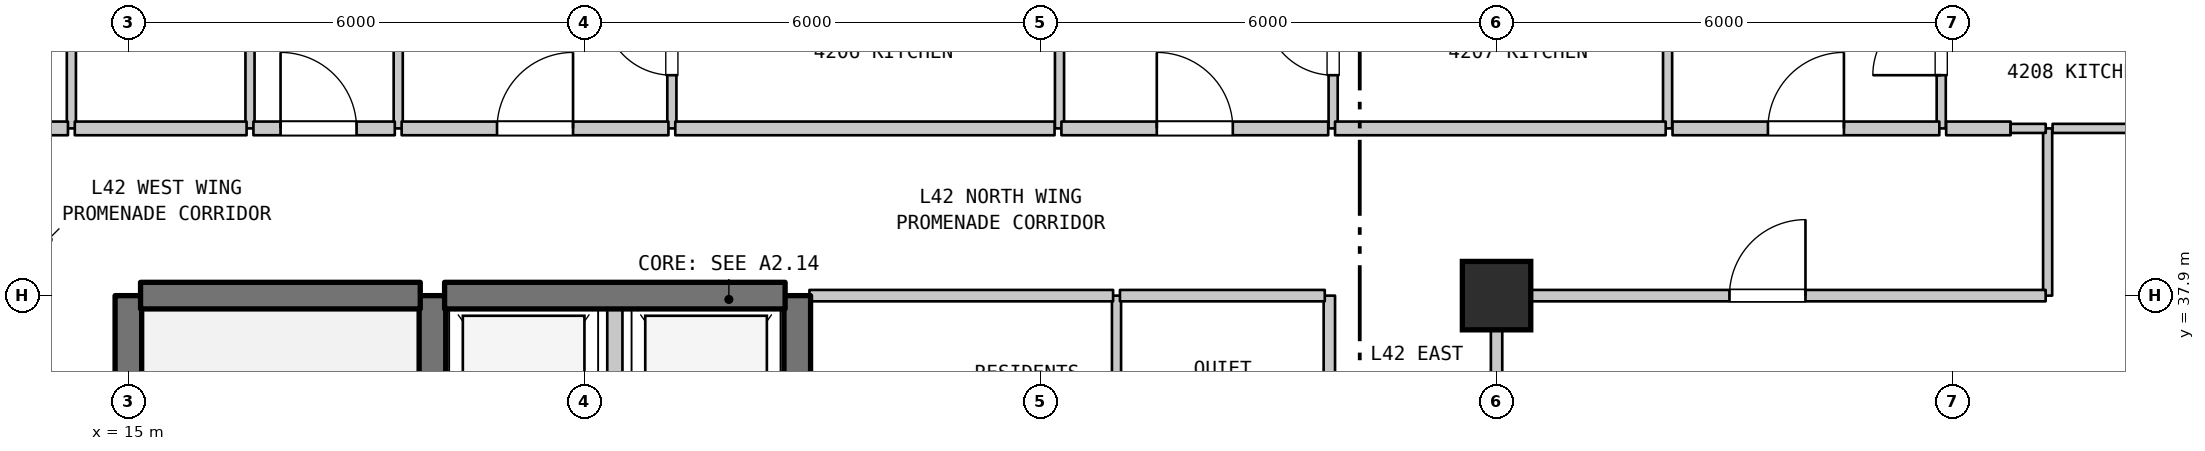
"""IFC4 building model, lengths in metres.
Left out: names, types, materials, properties, quantities, classifications, styles, units other than length and angle.
Written with IfcOpenShell. Run it as: python <this file> out.ifc"""

import sys

from ifc_helpers import new_model, si_unit, direction, frame, frame_2d, origin, origin_2d, place, context, subcontext, project, spatial, rectangle, extrude, element, fill, save


model = new_model("IFC4")
c1 = context("Model", 3, precision=1e-05, world=origin(), true_north=direction((0.0, 1.0)))
c2 = subcontext(c1, "Body", "Model", "MODEL_VIEW")
j1 = project(units=[si_unit("LENGTHUNIT", "METRE"), si_unit("PLANEANGLEUNIT", "RADIAN")], contexts=[c1])
p1 = place(None, origin())
s1 = spatial("IfcSite", under=j1, at=p1, CompositionType="ELEMENT")
p2 = place(p1, origin())
s2 = spatial("IfcBuilding", under=s1, at=p2, CompositionType="ELEMENT")
p3 = place(p2, frame((0.0, 0.0, 172.8)))
s3 = spatial("IfcBuildingStorey", under=s2, at=p3, CompositionType="ELEMENT", Elevation=172.8)
p4 = place(p3, frame((33.0, 37.9, 0.0), z_axis=(0.0, 0.0, 1.0), x_axis=(1.0, 0.0, 0.0)))
e1 = element("IfcColumn", 1, at=p4, inside=s3, PredefinedType="COLUMN", context=c2, shape_type="SweptSolid", body=[
    extrude(rectangle(XDim=0.9, YDim=0.9, at=origin_2d()), origin(), (0.0, 0.0, 1.0), 3.7),
])
p5 = place(p3, frame((14.25, 40.1, 0.0), z_axis=(0.0, 0.0, 1.0), x_axis=(0.0, 1.0, 0.0)))
e2 = element("IfcWall", 2, at=p5, inside=s3, PredefinedType="PARTITIONING", context=c2, shape_type="SweptSolid", body=[
    extrude(rectangle(XDim=3.2, YDim=0.12, at=frame_2d((1.6, 0.0))), origin(), (0.0, 0.0, 1.0), 3.39),
])
p6 = place(p5, frame((1.15, 0.0, 0.0)))
e3 = element("IfcOpeningElement", 3, at=p6, cuts=e2, PredefinedType="OPENING", context=c2, shape_type="SweptSolid", body=[
    extrude(rectangle(XDim=0.9, YDim=2.15, at=frame_2d((0.45, 1.075))), frame((0.0, 0.07, 0.0), z_axis=(0.0, -1.0, 0.0), x_axis=(1.0, 0.0, 0.0)), (0.0, 0.0, 1.0), 0.14),
])
p7 = place(p3, frame((15.0, 31.1, 0.0), z_axis=(0.0, 0.0, 1.0), x_axis=(0.0, 1.0, 0.0)))
e4 = element("IfcWall", 4, at=p7, inside=s3, PredefinedType="SHEAR", context=c2, shape_type="SweptSolid", body=[
    extrude(rectangle(XDim=6.8, YDim=0.35, at=frame_2d((3.4, 0.0))), origin(), (0.0, 0.0, 1.0), 3.39),
])
p8 = place(p3, frame((16.6, 40.1, 0.0), z_axis=(0.0, 0.0, 1.0), x_axis=(0.0, 1.0, 0.0)))
e5 = element("IfcWall", 5, at=p8, inside=s3, PredefinedType="PARTITIONING", context=c2, shape_type="SweptSolid", body=[
    extrude(rectangle(XDim=3.2, YDim=0.12, at=frame_2d((1.6, 0.0))), origin(), (0.0, 0.0, 1.0), 3.39),
])
p9 = place(p3, frame((18.55, 40.1, 0.0), z_axis=(0.0, 0.0, 1.0), x_axis=(0.0, 1.0, 0.0)))
e6 = element("IfcWall", 6, at=p9, inside=s3, PredefinedType="PARTITIONING", context=c2, shape_type="SweptSolid", body=[
    extrude(rectangle(XDim=13.79, YDim=0.12, at=frame_2d((6.895, 0.0))), origin(), (0.0, 0.0, 1.0), 3.39),
])
p10 = place(p3, frame((19.0, 35.0, 0.0), z_axis=(0.0, 0.0, 1.0), x_axis=(0.0, 1.0, 0.0)))
e7 = element("IfcWall", 7, at=p10, inside=s3, PredefinedType="SHEAR", context=c2, shape_type="SweptSolid", body=[
    extrude(rectangle(XDim=2.9, YDim=0.35, at=frame_2d((1.45, 0.0))), origin(), (0.0, 0.0, 1.0), 3.39),
])
p11 = place(p3, frame((21.4, 35.0, 0.0), z_axis=(0.0, 0.0, 1.0), x_axis=(0.0, 1.0, 0.0)))
e8 = element("IfcWall", 8, at=p11, inside=s3, PredefinedType="STANDARD", context=c2, shape_type="SweptSolid", body=[
    extrude(rectangle(XDim=2.9, YDim=0.2, at=frame_2d((1.45, 0.0))), origin(), (0.0, 0.0, 1.0), 3.39),
])
p12 = place(p3, frame((22.15, 40.1, 0.0), z_axis=(0.0, 0.0, 1.0), x_axis=(0.0, 1.0, 0.0)))
e9 = element("IfcWall", 9, at=p12, inside=s3, PredefinedType="PARTITIONING", context=c2, shape_type="SweptSolid", body=[
    extrude(rectangle(XDim=2.3, YDim=0.12, at=frame_2d((1.15, 0.0))), origin(), (0.0, 0.0, 1.0), 3.39),
])
p13 = place(p12, frame((0.7, 0.0, 0.0)))
e10 = element("IfcOpeningElement", 10, at=p13, cuts=e9, PredefinedType="OPENING", context=c2, shape_type="SweptSolid", body=[
    extrude(rectangle(XDim=0.9, YDim=2.15, at=frame_2d((0.45, 1.075))), frame((0.0, 0.07, 0.0), z_axis=(0.0, -1.0, 0.0), x_axis=(1.0, 0.0, 0.0)), (0.0, 0.0, 1.0), 0.14),
])
p14 = place(p3, frame((23.8, 35.0, 0.0), z_axis=(0.0, 0.0, 1.0), x_axis=(0.0, 1.0, 0.0)))
e11 = element("IfcWall", 11, at=p14, inside=s3, PredefinedType="SHEAR", context=c2, shape_type="SweptSolid", body=[
    extrude(rectangle(XDim=2.9, YDim=0.35, at=frame_2d((1.45, 0.0))), origin(), (0.0, 0.0, 1.0), 3.39),
])
p15 = place(p3, frame((27.25, 40.1, 0.0), z_axis=(0.0, 0.0, 1.0), x_axis=(0.0, 1.0, 0.0)))
e12 = element("IfcWall", 12, at=p15, inside=s3, PredefinedType="PARTITIONING", context=c2, shape_type="SweptSolid", body=[
    extrude(rectangle(XDim=2.3, YDim=0.12, at=frame_2d((1.15, 0.0))), origin(), (0.0, 0.0, 1.0), 3.39),
])
p16 = place(p3, frame((28.0, 35.0, 0.0), z_axis=(0.0, 0.0, 1.0), x_axis=(0.0, 1.0, 0.0)))
e13 = element("IfcWall", 13, at=p16, inside=s3, PredefinedType="PARTITIONING", context=c2, shape_type="SweptSolid", body=[
    extrude(rectangle(XDim=2.9, YDim=0.12, at=frame_2d((1.45, 0.0))), origin(), (0.0, 0.0, 1.0), 3.39),
])
p17 = place(p3, frame((30.8, 35.0, 0.0), z_axis=(0.0, 0.0, 1.0), x_axis=(0.0, 1.0, 0.0)))
e14 = element("IfcWall", 14, at=p17, inside=s3, PredefinedType="STANDARD", context=c2, shape_type="SweptSolid", body=[
    extrude(rectangle(XDim=2.9, YDim=0.15, at=frame_2d((1.45, 0.0))), origin(), (0.0, 0.0, 1.0), 3.39),
])
p18 = place(p3, frame((30.85, 40.1, 0.0), z_axis=(0.0, 0.0, 1.0), x_axis=(0.0, 1.0, 0.0)))
e15 = element("IfcWall", 15, at=p18, inside=s3, PredefinedType="PARTITIONING", context=c2, shape_type="SweptSolid", body=[
    extrude(rectangle(XDim=2.3, YDim=0.12, at=frame_2d((1.15, 0.0))), origin(), (0.0, 0.0, 1.0), 3.39),
])
p19 = place(p18, frame((0.7, 0.0, 0.0)))
e16 = element("IfcOpeningElement", 16, at=p19, cuts=e15, PredefinedType="OPENING", context=c2, shape_type="SweptSolid", body=[
    extrude(rectangle(XDim=0.9, YDim=2.15, at=frame_2d((0.45, 1.075))), frame((0.0, 0.07, 0.0), z_axis=(0.0, -1.0, 0.0), x_axis=(1.0, 0.0, 0.0)), (0.0, 0.0, 1.0), 0.14),
])
p20 = place(p3, frame((33.0, 32.8, 0.0), z_axis=(0.0, 0.0, 1.0), x_axis=(0.0, 1.0, 0.0)))
e17 = element("IfcWall", 17, at=p20, inside=s3, PredefinedType="STANDARD", context=c2, shape_type="SweptSolid", body=[
    extrude(rectangle(XDim=5.1, YDim=0.15, at=frame_2d((2.55, 0.0))), origin(), (0.0, 0.0, 1.0), 2.89),
])
p21 = place(p20, frame((1.978, 0.0, 0.0)))
e18 = element("IfcOpeningElement", 18, at=p21, cuts=e17, PredefinedType="OPENING", context=c2, shape_type="SweptSolid", body=[
    extrude(rectangle(XDim=1.0, YDim=2.15, at=frame_2d((0.5, 1.075))), frame((0.0, 0.085, 0.0), z_axis=(0.0, -1.0, 0.0), x_axis=(1.0, 0.0, 0.0)), (0.0, 0.0, 1.0), 0.17),
])
p22 = place(p3, frame((35.25, 40.1, 0.0), z_axis=(0.0, 0.0, 1.0), x_axis=(0.0, 1.0, 0.0)))
e19 = element("IfcWall", 19, at=p22, inside=s3, PredefinedType="PARTITIONING", context=c2, shape_type="SweptSolid", body=[
    extrude(rectangle(XDim=2.3, YDim=0.12, at=frame_2d((1.15, 0.0))), origin(), (0.0, 0.0, 1.0), 3.39),
])
p23 = place(p3, frame((38.85, 40.1, 0.0), z_axis=(0.0, 0.0, 1.0), x_axis=(0.0, 1.0, 0.0)))
e20 = element("IfcWall", 20, at=p23, inside=s3, PredefinedType="PARTITIONING", context=c2, shape_type="SweptSolid", body=[
    extrude(rectangle(XDim=2.3, YDim=0.12, at=frame_2d((1.15, 0.0))), origin(), (0.0, 0.0, 1.0), 3.39),
])
p24 = place(p23, frame((0.7, 0.0, 0.0)))
e21 = element("IfcOpeningElement", 21, at=p24, cuts=e20, PredefinedType="OPENING", context=c2, shape_type="SweptSolid", body=[
    extrude(rectangle(XDim=0.9, YDim=2.15, at=frame_2d((0.45, 1.075))), frame((0.0, 0.07, 0.0), z_axis=(0.0, -1.0, 0.0), x_axis=(1.0, 0.0, 0.0)), (0.0, 0.0, 1.0), 0.14),
])
p25 = place(p3, frame((40.25, 37.9, 0.0), z_axis=(0.0, 0.0, 1.0), x_axis=(0.0, 1.0, 0.0)))
e22 = element("IfcWall", 22, at=p25, inside=s3, PredefinedType="PARTITIONING", context=c2, shape_type="SweptSolid", body=[
    extrude(rectangle(XDim=2.2, YDim=0.12, at=frame_2d((1.1, 0.0))), origin(), (0.0, 0.0, 1.0), 3.39),
])
p26 = place(p3, frame((15.16, 37.9, 0.0), z_axis=(0.0, 0.0, 1.0), x_axis=(1.0, 0.0, 0.0)))
e23 = element("IfcWall", 23, at=p26, inside=s3, PredefinedType="SHEAR", context=c2, shape_type="SweptSolid", body=[
    extrude(rectangle(XDim=3.68, YDim=0.35, at=frame_2d((1.84, 0.0))), origin(), (0.0, 0.0, 1.0), 3.39),
])
p27 = place(p3, frame((19.16, 37.9, 0.0), z_axis=(0.0, 0.0, 1.0), x_axis=(1.0, 0.0, 0.0)))
e24 = element("IfcWall", 24, at=p27, inside=s3, PredefinedType="SHEAR", context=c2, shape_type="SweptSolid", body=[
    extrude(rectangle(XDim=4.48, YDim=0.35, at=frame_2d((2.24, 0.0))), origin(), (0.0, 0.0, 1.0), 3.39),
])
p28 = place(p3, frame((23.96, 37.9, 0.0), z_axis=(0.0, 0.0, 1.0), x_axis=(1.0, 0.0, 0.0)))
e25 = element("IfcWall", 25, at=p28, inside=s3, PredefinedType="STANDARD", context=c2, shape_type="SweptSolid", body=[
    extrude(rectangle(XDim=3.995, YDim=0.15, at=frame_2d((1.998, 0.0))), origin(), (0.0, 0.0, 1.0), 2.89),
])
p29 = place(p3, frame((28.045, 37.9, 0.0), z_axis=(0.0, 0.0, 1.0), x_axis=(1.0, 0.0, 0.0)))
e26 = element("IfcWall", 26, at=p29, inside=s3, PredefinedType="STANDARD", context=c2, shape_type="SweptSolid", body=[
    extrude(rectangle(XDim=2.695, YDim=0.15, at=frame_2d((1.348, 0.0))), origin(), (0.0, 0.0, 1.0), 2.89),
])
p30 = place(p3, frame((33.06, 37.9, 0.0), z_axis=(0.0, 0.0, 1.0), x_axis=(1.0, 0.0, 0.0)))
e27 = element("IfcWall", 27, at=p30, inside=s3, PredefinedType="STANDARD", context=c2, shape_type="SweptSolid", body=[
    extrude(rectangle(XDim=7.164, YDim=0.15, at=frame_2d((3.582, 0.0))), origin(), (0.0, 0.0, 1.0), 3.39),
])
p31 = place(p30, frame((3.004, 0.0, 0.0)))
e28 = element("IfcOpeningElement", 28, at=p31, cuts=e27, PredefinedType="OPENING", context=c2, shape_type="SweptSolid", body=[
    extrude(rectangle(XDim=1.0, YDim=2.15, at=frame_2d((0.5, 1.075))), frame((0.0, 0.085, 0.0), z_axis=(0.0, -1.0, 0.0), x_axis=(1.0, 0.0, 0.0)), (0.0, 0.0, 1.0), 0.17),
])
p32 = place(p3, frame((12.875, 40.1, 0.0), z_axis=(0.0, 0.0, 1.0), x_axis=(1.0, 0.0, 0.0)))
e29 = element("IfcWall", 29, at=p32, inside=s3, PredefinedType="STANDARD", context=c2, shape_type="SweptSolid", body=[
    extrude(rectangle(XDim=1.33, YDim=0.18, at=frame_2d((0.665, 0.0))), origin(), (0.0, 0.0, 1.0), 3.39),
])
p33 = place(p3, frame((14.295, 40.1, 0.0), z_axis=(0.0, 0.0, 1.0), x_axis=(1.0, 0.0, 0.0)))
e30 = element("IfcWall", 30, at=p33, inside=s3, PredefinedType="STANDARD", context=c2, shape_type="SweptSolid", body=[
    extrude(rectangle(XDim=2.26, YDim=0.18, at=frame_2d((1.13, 0.0))), origin(), (0.0, 0.0, 1.0), 3.39),
])
p34 = place(p3, frame((16.645, 40.1, 0.0), z_axis=(0.0, 0.0, 1.0), x_axis=(1.0, 0.0, 0.0)))
e31 = element("IfcWall", 31, at=p34, inside=s3, PredefinedType="STANDARD", context=c2, shape_type="SweptSolid", body=[
    extrude(rectangle(XDim=1.86, YDim=0.18, at=frame_2d((0.93, 0.0))), origin(), (0.0, 0.0, 1.0), 3.39),
])
p35 = place(p34, frame((0.357, 0.0, 0.0)))
e32 = element("IfcOpeningElement", 32, at=p35, cuts=e31, PredefinedType="OPENING", context=c2, shape_type="SweptSolid", body=[
    extrude(rectangle(XDim=1.0, YDim=2.15, at=frame_2d((0.5, 1.075))), frame((0.0, 0.1, 0.0), z_axis=(0.0, -1.0, 0.0), x_axis=(1.0, 0.0, 0.0)), (0.0, 0.0, 1.0), 0.2),
])
p36 = place(p3, frame((18.595, 40.1, 0.0), z_axis=(0.0, 0.0, 1.0), x_axis=(1.0, 0.0, 0.0)))
e33 = element("IfcWall", 33, at=p36, inside=s3, PredefinedType="STANDARD", context=c2, shape_type="SweptSolid", body=[
    extrude(rectangle(XDim=3.51, YDim=0.18, at=frame_2d((1.755, 0.0))), origin(), (0.0, 0.0, 1.0), 3.39),
])
p37 = place(p36, frame((1.255, 0.0, 0.0)))
e34 = element("IfcOpeningElement", 34, at=p37, cuts=e33, PredefinedType="OPENING", context=c2, shape_type="SweptSolid", body=[
    extrude(rectangle(XDim=1.0, YDim=2.15, at=frame_2d((0.5, 1.075))), frame((0.0, 0.1, 0.0), z_axis=(0.0, -1.0, 0.0), x_axis=(1.0, 0.0, 0.0)), (0.0, 0.0, 1.0), 0.2),
])
p38 = place(p3, frame((22.195, 40.1, 0.0), z_axis=(0.0, 0.0, 1.0), x_axis=(1.0, 0.0, 0.0)))
e35 = element("IfcWall", 35, at=p38, inside=s3, PredefinedType="STANDARD", context=c2, shape_type="SweptSolid", body=[
    extrude(rectangle(XDim=4.99, YDim=0.18, at=frame_2d((2.495, 0.0))), origin(), (0.0, 0.0, 1.0), 3.39),
])
p39 = place(p3, frame((27.275, 40.1, 0.0), z_axis=(0.0, 0.0, 1.0), x_axis=(1.0, 0.0, 0.0)))
e36 = element("IfcWall", 36, at=p39, inside=s3, PredefinedType="STANDARD", context=c2, shape_type="SweptSolid", body=[
    extrude(rectangle(XDim=3.51, YDim=0.18, at=frame_2d((1.755, 0.0))), origin(), (0.0, 0.0, 1.0), 3.39),
])
p40 = place(p39, frame((1.255, 0.0, 0.0)))
e37 = element("IfcOpeningElement", 37, at=p40, cuts=e36, PredefinedType="OPENING", context=c2, shape_type="SweptSolid", body=[
    extrude(rectangle(XDim=1.0, YDim=2.15, at=frame_2d((0.5, 1.075))), frame((0.0, 0.1, 0.0), z_axis=(0.0, -1.0, 0.0), x_axis=(1.0, 0.0, 0.0)), (0.0, 0.0, 1.0), 0.2),
])
p41 = place(p3, frame((30.875, 40.1, 0.0), z_axis=(0.0, 0.0, 1.0), x_axis=(1.0, 0.0, 0.0)))
e38 = element("IfcWall", 38, at=p41, inside=s3, PredefinedType="STANDARD", context=c2, shape_type="SweptSolid", body=[
    extrude(rectangle(XDim=4.35, YDim=0.18, at=frame_2d((2.175, 0.0))), origin(), (0.0, 0.0, 1.0), 3.39),
])
p42 = place(p3, frame((35.315, 40.1, 0.0), z_axis=(0.0, 0.0, 1.0), x_axis=(1.0, 0.0, 0.0)))
e39 = element("IfcWall", 39, at=p42, inside=s3, PredefinedType="STANDARD", context=c2, shape_type="SweptSolid", body=[
    extrude(rectangle(XDim=3.51, YDim=0.18, at=frame_2d((1.755, 0.0))), origin(), (0.0, 0.0, 1.0), 3.39),
])
p43 = place(p42, frame((1.255, 0.0, 0.0)))
e40 = element("IfcOpeningElement", 40, at=p43, cuts=e39, PredefinedType="OPENING", context=c2, shape_type="SweptSolid", body=[
    extrude(rectangle(XDim=1.0, YDim=2.15, at=frame_2d((0.5, 1.075))), frame((0.0, 0.1, 0.0), z_axis=(0.0, -1.0, 0.0), x_axis=(1.0, 0.0, 0.0)), (0.0, 0.0, 1.0), 0.2),
])
p44 = place(p3, frame((38.915, 40.1, 0.0), z_axis=(0.0, 0.0, 1.0), x_axis=(1.0, 0.0, 0.0)))
e41 = element("IfcWall", 41, at=p44, inside=s3, PredefinedType="STANDARD", context=c2, shape_type="SweptSolid", body=[
    extrude(rectangle(XDim=0.848, YDim=0.18, at=frame_2d((0.424, 0.0))), origin(), (0.0, 0.0, 1.0), 3.39),
])
p45 = place(p3, frame((39.763, 40.1, 0.0), z_axis=(0.0, 0.0, 1.0), x_axis=(1.0, 0.0, 0.0)))
e42 = element("IfcWall", 42, at=p45, inside=s3, PredefinedType="PARTITIONING", context=c2, shape_type="SweptSolid", body=[
    extrude(rectangle(XDim=0.462, YDim=0.12, at=frame_2d((0.231, 0.0))), origin(), (0.0, 0.0, 1.0), 3.39),
])
p46 = place(p3, frame((40.315, 40.1, 0.0), z_axis=(0.0, 0.0, 1.0), x_axis=(1.0, 0.0, 0.0)))
e43 = element("IfcWall", 43, at=p46, inside=s3, PredefinedType="PARTITIONING", context=c2, shape_type="SweptSolid", body=[
    extrude(rectangle(XDim=1.86, YDim=0.12, at=frame_2d((0.93, 0.0))), origin(), (0.0, 0.0, 1.0), 3.39),
])
p47 = place(p13, origin())
e44 = element("IfcDoor", 44, at=p47, inside=s3, OperationType="SINGLE_SWING_RIGHT", PredefinedType="DOOR", context=c2, shape_type="SweptSolid", body=[
    extrude(rectangle(XDim=0.9, YDim=2.15, at=frame_2d((0.45, 1.075))), frame((0.0, 0.025, 0.0), z_axis=(0.0, -1.0, 0.0), x_axis=(1.0, 0.0, 0.0)), (0.0, 0.0, 1.0), 0.05),
])
fill(e10, e44)
p48 = place(p19, origin())
e45 = element("IfcDoor", 45, at=p48, inside=s3, OperationType="SINGLE_SWING_RIGHT", PredefinedType="DOOR", context=c2, shape_type="SweptSolid", body=[
    extrude(rectangle(XDim=0.9, YDim=2.15, at=frame_2d((0.45, 1.075))), frame((0.0, 0.025, 0.0), z_axis=(0.0, -1.0, 0.0), x_axis=(1.0, 0.0, 0.0)), (0.0, 0.0, 1.0), 0.05),
])
fill(e16, e45)
p49 = place(p24, origin())
e46 = element("IfcDoor", 46, at=p49, inside=s3, OperationType="SINGLE_SWING_LEFT", PredefinedType="DOOR", context=c2, shape_type="SweptSolid", body=[
    extrude(rectangle(XDim=0.9, YDim=2.15, at=frame_2d((0.45, 1.075))), frame((0.0, 0.025, 0.0), z_axis=(0.0, -1.0, 0.0), x_axis=(1.0, 0.0, 0.0)), (0.0, 0.0, 1.0), 0.05),
])
fill(e21, e46)
p50 = place(p31, origin())
e47 = element("IfcDoor", 47, at=p50, inside=s3, OperationType="SINGLE_SWING_RIGHT", PredefinedType="DOOR", context=c2, shape_type="SweptSolid", body=[
    extrude(rectangle(XDim=1.0, YDim=2.15, at=frame_2d((0.5, 1.075))), frame((0.0, 0.025, 0.0), z_axis=(0.0, -1.0, 0.0), x_axis=(1.0, 0.0, 0.0)), (0.0, 0.0, 1.0), 0.05),
])
fill(e28, e47)
p51 = place(p35, origin())
e48 = element("IfcDoor", 48, at=p51, inside=s3, OperationType="SINGLE_SWING_LEFT", PredefinedType="DOOR", context=c2, shape_type="SweptSolid", body=[
    extrude(rectangle(XDim=1.0, YDim=2.15, at=frame_2d((0.5, 1.075))), frame((0.0, 0.025, 0.0), z_axis=(0.0, -1.0, 0.0), x_axis=(1.0, 0.0, 0.0)), (0.0, 0.0, 1.0), 0.05),
])
fill(e32, e48)
p52 = place(p37, origin())
e49 = element("IfcDoor", 49, at=p52, inside=s3, OperationType="SINGLE_SWING_RIGHT", PredefinedType="DOOR", context=c2, shape_type="SweptSolid", body=[
    extrude(rectangle(XDim=1.0, YDim=2.15, at=frame_2d((0.5, 1.075))), frame((0.0, 0.025, 0.0), z_axis=(0.0, -1.0, 0.0), x_axis=(1.0, 0.0, 0.0)), (0.0, 0.0, 1.0), 0.05),
])
fill(e34, e49)
p53 = place(p40, origin())
e50 = element("IfcDoor", 50, at=p53, inside=s3, OperationType="SINGLE_SWING_LEFT", PredefinedType="DOOR", context=c2, shape_type="SweptSolid", body=[
    extrude(rectangle(XDim=1.0, YDim=2.15, at=frame_2d((0.5, 1.075))), frame((0.0, 0.025, 0.0), z_axis=(0.0, -1.0, 0.0), x_axis=(1.0, 0.0, 0.0)), (0.0, 0.0, 1.0), 0.05),
])
fill(e37, e50)
p54 = place(p43, origin())
e51 = element("IfcDoor", 51, at=p54, inside=s3, OperationType="SINGLE_SWING_RIGHT", PredefinedType="DOOR", context=c2, shape_type="SweptSolid", body=[
    extrude(rectangle(XDim=1.0, YDim=2.15, at=frame_2d((0.5, 1.075))), frame((0.0, 0.025, 0.0), z_axis=(0.0, -1.0, 0.0), x_axis=(1.0, 0.0, 0.0)), (0.0, 0.0, 1.0), 0.05),
])
fill(e40, e51)
save(model, sys.argv[1])
